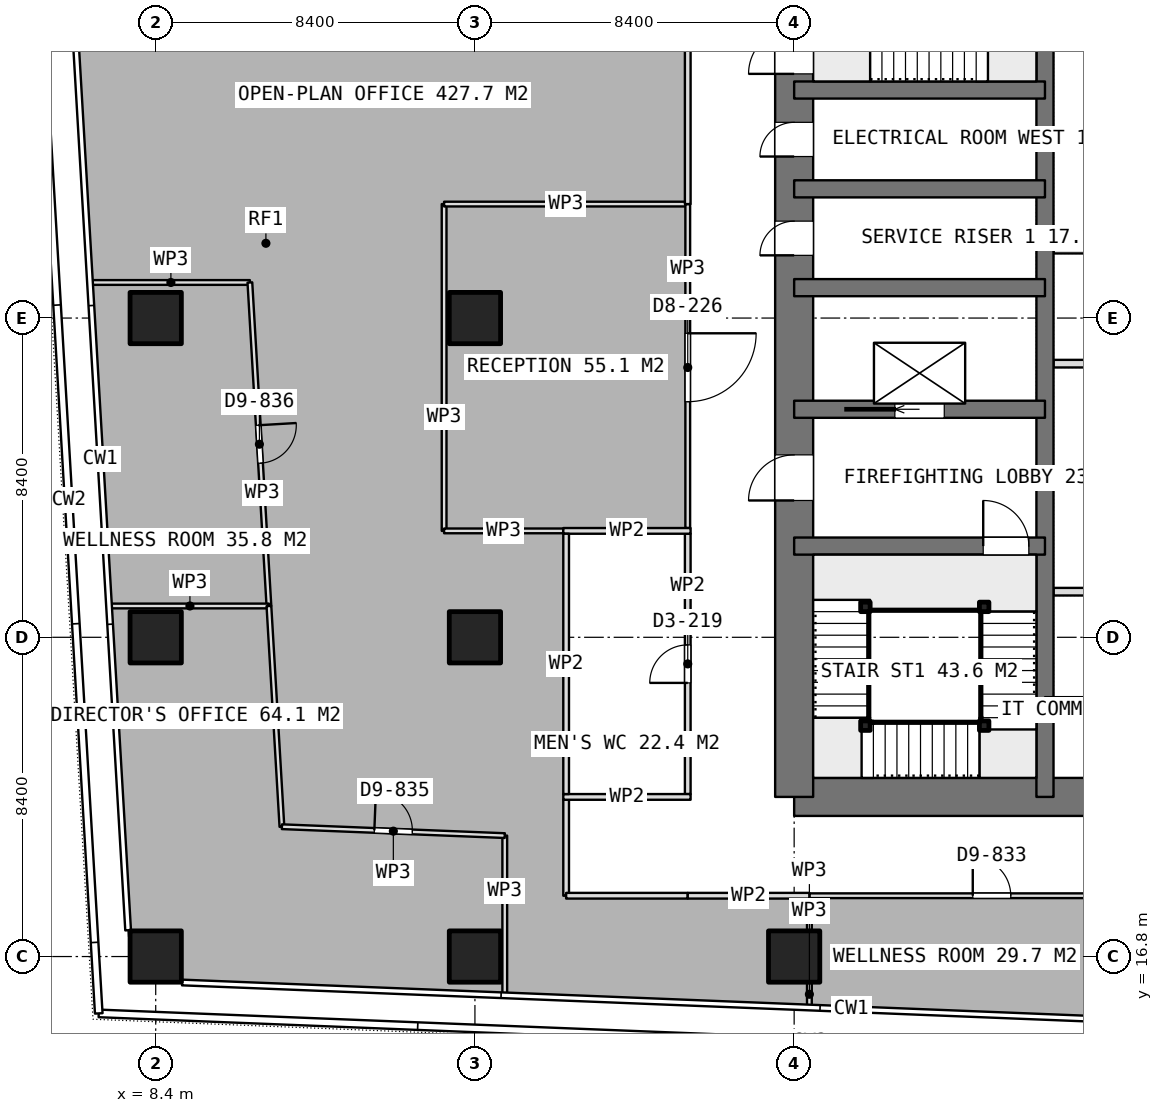
"""IFC4 building model, lengths in metres.
Left out: names, types, materials, properties, quantities, classifications, styles, units other than length and angle.
Written with IfcOpenShell. Run it as: python <this file> out.ifc"""

import sys

from ifc_helpers import new_model, si_unit, direction, frame, frame_2d, origin, origin_2d, place, context, subcontext, project, spatial, rectangle, extrude, element, fill, save


model = new_model("IFC4")
c1 = context("Model", 3, precision=1e-05, world=origin(), true_north=direction((0.0, 1.0)))
c2 = subcontext(c1, "Body", "Model", "MODEL_VIEW")
j1 = project(units=[si_unit("LENGTHUNIT", "METRE"), si_unit("PLANEANGLEUNIT", "RADIAN")], contexts=[c1])
p1 = place(None, origin())
s1 = spatial("IfcSite", under=j1, at=p1, CompositionType="ELEMENT")
p2 = place(p1, origin())
s2 = spatial("IfcBuilding", under=s1, at=p2, CompositionType="ELEMENT")
p3 = place(p2, frame((0.0, 0.0, 206.45)))
s3 = spatial("IfcBuildingStorey", under=s2, at=p3, CompositionType="ELEMENT", Elevation=206.45)
p4 = place(p3, frame((25.2, 21.0, 0.0), z_axis=(0.0, 0.0, 1.0), x_axis=(1.0, 0.0, 0.0)))
e1 = element("IfcWall", 1, at=p4, inside=s3, PredefinedType="SHEAR", context=c2, shape_type="SweptSolid", body=[
    extrude(rectangle(XDim=10.4, YDim=1.0, at=frame_2d((5.2, 0.0))), origin(), (0.0, 0.0, 1.0), 3.75),
])
p5 = place(p3, frame((25.2, 21.0, 0.0), z_axis=(0.0, 0.0, 1.0), x_axis=(0.0, 1.0, 0.0)))
e2 = element("IfcWall", 2, at=p5, inside=s3, PredefinedType="SHEAR", context=c2, shape_type="SweptSolid", body=[
    extrude(rectangle(XDim=25.2, YDim=1.0, at=frame_2d((12.6, 0.0))), origin(), (0.0, 0.0, 1.0), 3.75),
])
p6 = place(p5, frame((7.8, 0.0, 0.0)))
e3 = element("IfcOpeningElement", 3, at=p6, cuts=e2, PredefinedType="OPENING", context=c2, shape_type="SweptSolid", body=[
    extrude(rectangle(XDim=1.2, YDim=2.1, at=frame_2d((0.6, 1.05))), frame((0.0, 0.51, 0.0), z_axis=(0.0, -1.0, 0.0), x_axis=(1.0, 0.0, 0.0)), (0.0, 0.0, 1.0), 1.02),
])
p7 = place(p5, frame((14.25, 0.0, 0.0)))
e4 = element("IfcOpeningElement", 4, at=p7, cuts=e2, PredefinedType="OPENING", context=c2, shape_type="SweptSolid", body=[
    extrude(rectangle(XDim=0.9, YDim=2.1, at=frame_2d((0.45, 1.05))), frame((0.0, 0.51, 0.0), z_axis=(0.0, -1.0, 0.0), x_axis=(1.0, 0.0, 0.0)), (0.0, 0.0, 1.0), 1.02),
])
p8 = place(p5, frame((16.85, 0.0, 0.0)))
e5 = element("IfcOpeningElement", 5, at=p8, cuts=e2, PredefinedType="OPENING", context=c2, shape_type="SweptSolid", body=[
    extrude(rectangle(XDim=0.9, YDim=2.1, at=frame_2d((0.45, 1.05))), frame((0.0, 0.51, 0.0), z_axis=(0.0, -1.0, 0.0), x_axis=(1.0, 0.0, 0.0)), (0.0, 0.0, 1.0), 1.02),
])
p9 = place(p5, frame((19.025, 0.0, 0.0)))
e6 = element("IfcOpeningElement", 6, at=p9, cuts=e2, PredefinedType="OPENING", context=c2, shape_type="SweptSolid", body=[
    extrude(rectangle(XDim=1.2, YDim=2.1, at=frame_2d((0.6, 1.05))), frame((0.0, 0.51, 0.0), z_axis=(0.0, -1.0, 0.0), x_axis=(1.0, 0.0, 0.0)), (0.0, 0.0, 1.0), 1.02),
])
p10 = place(p3, frame((31.8, 21.0, 0.0), z_axis=(0.0, 0.0, 1.0), x_axis=(0.0, 1.0, 0.0)))
e7 = element("IfcWall", 7, at=p10, inside=s3, PredefinedType="SHEAR", context=c2, shape_type="SweptSolid", body=[
    extrude(rectangle(XDim=25.2, YDim=0.45, at=frame_2d((12.6, 0.0))), origin(), (0.0, 0.0, 1.0), 3.75),
])
p11 = place(p3, frame((31.8, 23.4, 0.0), z_axis=(0.0, 0.0, 1.0), x_axis=(1.0, 0.0, 0.0)))
e8 = element("IfcWall", 8, at=p11, inside=s3, PredefinedType="SHEAR", context=c2, shape_type="SweptSolid", body=[
    extrude(rectangle(XDim=3.8, YDim=0.45, at=frame_2d((1.9, 0.0))), origin(), (0.0, 0.0, 1.0), 3.75),
])
p12 = place(p3, frame((25.2, 27.6, 0.0), z_axis=(0.0, 0.0, 1.0), x_axis=(1.0, 0.0, 0.0)))
e9 = element("IfcWall", 9, at=p12, inside=s3, PredefinedType="SHEAR", context=c2, shape_type="SweptSolid", body=[
    extrude(rectangle(XDim=6.6, YDim=0.45, at=frame_2d((3.3, 0.0))), origin(), (0.0, 0.0, 1.0), 3.75),
])
p13 = place(p12, frame((4.975, 0.0, 0.0)))
e10 = element("IfcOpeningElement", 10, at=p13, cuts=e9, PredefinedType="OPENING", context=c2, shape_type="SweptSolid", body=[
    extrude(rectangle(XDim=1.2, YDim=2.1, at=frame_2d((0.6, 1.05))), frame((0.0, 0.235, 0.0), z_axis=(0.0, -1.0, 0.0), x_axis=(1.0, 0.0, 0.0)), (0.0, 0.0, 1.0), 0.47),
])
p14 = place(p3, frame((25.2, 31.2, 0.0), z_axis=(0.0, 0.0, 1.0), x_axis=(1.0, 0.0, 0.0)))
e11 = element("IfcWall", 11, at=p14, inside=s3, PredefinedType="SHEAR", context=c2, shape_type="SweptSolid", body=[
    extrude(rectangle(XDim=6.6, YDim=0.45, at=frame_2d((3.3, 0.0))), origin(), (0.0, 0.0, 1.0), 3.75),
])
p15 = place(p14, frame((2.65, 0.0, 0.0)))
e12 = element("IfcOpeningElement", 12, at=p15, cuts=e11, PredefinedType="OPENING", context=c2, shape_type="SweptSolid", body=[
    extrude(rectangle(XDim=1.3, YDim=2.1, at=frame_2d((0.65, 1.05))), frame((0.0, 0.235, 0.0), z_axis=(0.0, -1.0, 0.0), x_axis=(1.0, 0.0, 0.0)), (0.0, 0.0, 1.0), 0.47),
])
for number, where, z_axis, x_axis in (
    (13, (25.2, 34.4, 0.0), (0.0, 0.0, 1.0), (1.0, 0.0, 0.0)),
    (14, (25.2, 37.0, 0.0), (0.0, 0.0, 1.0), (1.0, 0.0, 0.0)),
    (15, (25.2, 39.6, 0.0), (0.0, 0.0, 1.0), (1.0, 0.0, 0.0)),
):
    element("IfcWall", number, at=place(p3, frame(where, z_axis=z_axis, x_axis=x_axis)), inside=s3, PredefinedType="SHEAR", context=c2, shape_type="SweptSolid", body=[
        extrude(rectangle(XDim=6.6, YDim=0.45, at=frame_2d((3.3, 0.0))), origin(), (0.0, 0.0, 1.0), 3.75),
    ])
for number, where, z_axis, x_axis in (
    (16, (8.4, 16.8, 0.0), (0.0, 0.0, 1.0), (1.0, 0.0, 0.0)),
    (17, (8.4, 25.2, 0.0), (0.0, 0.0, 1.0), (1.0, 0.0, 0.0)),
    (18, (8.4, 33.6, 0.0), (0.0, 0.0, 1.0), (1.0, 0.0, 0.0)),
    (19, (16.8, 16.8, 0.0), (0.0, 0.0, 1.0), (1.0, 0.0, 0.0)),
    (20, (16.8, 25.2, 0.0), (0.0, 0.0, 1.0), (1.0, 0.0, 0.0)),
    (21, (16.8, 33.6, 0.0), (0.0, 0.0, 1.0), (1.0, 0.0, 0.0)),
    (22, (25.2, 16.8, 0.0), (0.0, 0.0, 1.0), (1.0, 0.0, 0.0)),
):
    element("IfcColumn", number, at=place(p3, frame(where, z_axis=z_axis, x_axis=x_axis)), inside=s3, PredefinedType="COLUMN", context=c2, shape_type="SweptSolid", body=[
        extrude(rectangle(XDim=1.35, YDim=1.35, at=origin_2d()), origin(), (0.0, 0.0, 1.0), 3.75),
    ])
for number, where, z_axis, x_axis in (
    (23, (32.025, 26.4, 0.0), (0.0, 0.0, 1.0), (1.0, 0.0, 0.0)),
    (24, (32.025, 29.4, 0.0), (0.0, 0.0, 1.0), (1.0, 0.0, 0.0)),
    (25, (32.025, 32.4, 0.0), (0.0, 0.0, 1.0), (1.0, 0.0, 0.0)),
    (26, (32.025, 35.4, 0.0), (0.0, 0.0, 1.0), (1.0, 0.0, 0.0)),
    (27, (32.025, 38.4, 0.0), (0.0, 0.0, 1.0), (1.0, 0.0, 0.0)),
):
    element("IfcWall", number, at=place(p3, frame(where, z_axis=z_axis, x_axis=x_axis)), inside=s3, PredefinedType="PARTITIONING", context=c2, shape_type="SweptSolid", body=[
        extrude(rectangle(XDim=3.35, YDim=0.2, at=frame_2d((1.675, 0.0))), origin(), (0.0, 0.0, 1.0), 3.5),
    ])
for number, where, z_axis, x_axis in (
    (28, (19.125, 21.0, 0.0), (0.0, 0.0, 1.0), (1.0, 0.0, 0.0)),
    (29, (19.125, 28.0, 0.0), (0.0, 0.0, 1.0), (1.0, 0.0, 0.0)),
):
    element("IfcWall", number, at=place(p3, frame(where, z_axis=z_axis, x_axis=x_axis)), inside=s3, PredefinedType="PARTITIONING", context=c2, shape_type="SweptSolid", body=[
        extrude(rectangle(XDim=3.35, YDim=0.15, at=frame_2d((1.675, 0.0))), origin(), (0.0, 0.0, 1.0), 3.5),
    ])
p16 = place(p3, frame((19.2, 21.075, 0.0), z_axis=(0.0, 0.0, 1.0), x_axis=(0.0, 1.0, 0.0)))
e30 = element("IfcWall", 30, at=p16, inside=s3, PredefinedType="PARTITIONING", context=c2, shape_type="SweptSolid", body=[
    extrude(rectangle(XDim=6.85, YDim=0.15, at=frame_2d((3.425, 0.0))), origin(), (0.0, 0.0, 1.0), 3.5),
])
p17 = place(p3, frame((22.4, 21.075, 0.0), z_axis=(0.0, 0.0, 1.0), x_axis=(0.0, 1.0, 0.0)))
e31 = element("IfcWall", 31, at=p17, inside=s3, PredefinedType="PARTITIONING", context=c2, shape_type="SweptSolid", body=[
    extrude(rectangle(XDim=6.85, YDim=0.15, at=frame_2d((3.425, 0.0))), origin(), (0.0, 0.0, 1.0), 3.5),
])
p18 = place(p17, frame((2.925, 0.0, 0.0)))
e32 = element("IfcOpeningElement", 32, at=p18, cuts=e31, PredefinedType="OPENING", context=c2, shape_type="SweptSolid", body=[
    extrude(rectangle(XDim=1.0, YDim=2.1, at=frame_2d((0.5, 1.05))), frame((0.0, 0.085, 0.0), z_axis=(0.0, -1.0, 0.0), x_axis=(1.0, 0.0, 0.0)), (0.0, 0.0, 1.0), 0.17),
])
p19 = place(p3, frame((6.721, 34.536, 0.0), z_axis=(0.0, 0.0, 1.0), x_axis=(1.0, 0.0, 0.0)))
e33 = element("IfcWall", 33, at=p19, inside=s3, PredefinedType="PARTITIONING", context=c2, shape_type="SweptSolid", body=[
    extrude(rectangle(XDim=4.157, YDim=0.125, at=frame_2d((2.079, 0.0))), origin(), (0.0, 0.0, 1.0), 3.5),
])
p20 = place(p3, frame((10.878, 34.536, 0.0), z_axis=(0.0, 0.0, 1.0), x_axis=(0.058753912615, -0.998272496742, 0.0)))
e34 = element("IfcWall", 34, at=p20, inside=s3, PredefinedType="PARTITIONING", context=c2, shape_type="SweptSolid", body=[
    extrude(rectangle(XDim=8.527, YDim=0.125, at=frame_2d((4.263, 0.0))), origin(), (0.0, 0.0, 1.0), 3.5),
])
p21 = place(p20, frame((3.763, 0.0, 0.0)))
e35 = element("IfcOpeningElement", 35, at=p21, cuts=e34, PredefinedType="OPENING", context=c2, shape_type="SweptSolid", body=[
    extrude(rectangle(XDim=1.0, YDim=2.1, at=frame_2d((0.5, 1.05))), frame((0.0, 0.073, 0.0), z_axis=(0.0, -1.0, 0.0), x_axis=(1.0, 0.0, 0.0)), (0.0, 0.0, 1.0), 0.145),
])
p22 = place(p3, frame((11.379, 26.024, 0.0), z_axis=(0.0, 0.0, 1.0), x_axis=(-1.0, 0.0, 0.0)))
e36 = element("IfcWall", 36, at=p22, inside=s3, PredefinedType="PARTITIONING", context=c2, shape_type="SweptSolid", body=[
    extrude(rectangle(XDim=4.157, YDim=0.125, at=frame_2d((2.079, 0.0))), origin(), (0.0, 0.0, 1.0), 3.5),
])
p23 = place(p3, frame((17.585, 19.982, 0.0), z_axis=(0.0, 0.0, 1.0), x_axis=(0.0, -1.0, 0.0)))
e37 = element("IfcWall", 37, at=p23, inside=s3, PredefinedType="PARTITIONING", context=c2, shape_type="SweptSolid", body=[
    extrude(rectangle(XDim=4.153, YDim=0.125, at=frame_2d((2.076, 0.0))), origin(), (0.0, 0.0, 1.0), 3.5),
])
p24 = place(p3, frame((11.379, 26.023, 0.0), z_axis=(0.0, 0.0, 1.0), x_axis=(0.058800752748, -0.998269738836, 0.0)))
e38 = element("IfcWall", 38, at=p24, inside=s3, PredefinedType="PARTITIONING", context=c2, shape_type="SweptSolid", body=[
    extrude(rectangle(XDim=5.817, YDim=0.125, at=frame_2d((2.908, 0.0))), origin(), (0.0, 0.0, 1.0), 3.5),
])
p25 = place(p3, frame((11.721, 20.216, 0.0), z_axis=(0.0, 0.0, 1.0), x_axis=(0.999203880049, -0.039894938214, 0.0)))
e39 = element("IfcWall", 39, at=p25, inside=s3, PredefinedType="PARTITIONING", context=c2, shape_type="SweptSolid", body=[
    extrude(rectangle(XDim=5.869, YDim=0.125, at=frame_2d((2.934, 0.0))), origin(), (0.0, 0.0, 1.0), 3.5),
])
p26 = place(p25, frame((2.434, 0.0, 0.0)))
e40 = element("IfcOpeningElement", 40, at=p26, cuts=e39, PredefinedType="OPENING", context=c2, shape_type="SweptSolid", body=[
    extrude(rectangle(XDim=1.0, YDim=2.1, at=frame_2d((0.5, 1.05))), frame((0.0, 0.073, 0.0), z_axis=(0.0, -1.0, 0.0), x_axis=(1.0, 0.0, 0.0)), (0.0, 0.0, 1.0), 0.145),
])
p27 = place(p3, frame((25.601, 15.509, 0.0), z_axis=(0.0, 0.0, 1.0), x_axis=(0.0, 1.0, 0.0)))
e41 = element("IfcWall", 41, at=p27, inside=s3, PredefinedType="PARTITIONING", context=c2, shape_type="SweptSolid", body=[
    extrude(rectangle(XDim=0.596, YDim=0.125, at=frame_2d((0.298, 0.0))), origin(), (0.0, 0.0, 1.0), 3.5),
])
p28 = place(p3, frame((25.601, 17.495, 0.0), z_axis=(0.0, 0.0, 1.0), x_axis=(0.0, 1.0, 0.0)))
e42 = element("IfcWall", 42, at=p28, inside=s3, PredefinedType="PARTITIONING", context=c2, shape_type="SweptSolid", body=[
    extrude(rectangle(XDim=0.905, YDim=0.125, at=frame_2d((0.452, 0.0))), origin(), (0.0, 0.0, 1.0), 3.5),
])
p29 = place(p3, frame((25.601, 18.4, 0.0), z_axis=(0.0, 0.0, 1.0), x_axis=(1.0, 0.0, 0.0)))
e43 = element("IfcWall", 43, at=p29, inside=s3, PredefinedType="PARTITIONING", context=c2, shape_type="SweptSolid", body=[
    extrude(rectangle(XDim=9.597, YDim=0.125, at=frame_2d((4.798, 0.0))), origin(), (0.0, 0.0, 1.0), 3.5),
])
p30 = place(p29, frame((4.299, 0.0, 0.0)))
e44 = element("IfcOpeningElement", 44, at=p30, cuts=e43, PredefinedType="OPENING", context=c2, shape_type="SweptSolid", body=[
    extrude(rectangle(XDim=1.0, YDim=2.1, at=frame_2d((0.5, 1.05))), frame((0.0, 0.073, 0.0), z_axis=(0.0, -1.0, 0.0), x_axis=(1.0, 0.0, 0.0)), (0.0, 0.0, 1.0), 0.145),
])
p31 = place(p3, frame((15.989, 28.0, 0.0), z_axis=(0.0, 0.0, 1.0), x_axis=(0.0, 1.0, 0.0)))
e45 = element("IfcWall", 45, at=p31, inside=s3, PredefinedType="PARTITIONING", context=c2, shape_type="SweptSolid", body=[
    extrude(rectangle(XDim=8.599, YDim=0.125, at=frame_2d((4.3, 0.0))), origin(), (0.0, 0.0, 1.0), 3.5),
])
p32 = place(p3, frame((15.989, 36.599, 0.0), z_axis=(0.0, 0.0, 1.0), x_axis=(1.0, 0.0, 0.0)))
e46 = element("IfcWall", 46, at=p32, inside=s3, PredefinedType="PARTITIONING", context=c2, shape_type="SweptSolid", body=[
    extrude(rectangle(XDim=6.411, YDim=0.125, at=frame_2d((3.206, 0.0))), origin(), (0.0, 0.0, 1.0), 3.5),
])
p33 = place(p3, frame((22.4, 36.599, 0.0), z_axis=(0.0, 0.0, 1.0), x_axis=(0.0, -1.0, 0.0)))
e47 = element("IfcWall", 47, at=p33, inside=s3, PredefinedType="PARTITIONING", context=c2, shape_type="SweptSolid", body=[
    extrude(rectangle(XDim=8.524, YDim=0.125, at=frame_2d((4.262, 0.0))), origin(), (0.0, 0.0, 1.0), 3.5),
])
p34 = place(p33, frame((3.4, 0.0, 0.0)))
e48 = element("IfcOpeningElement", 48, at=p34, cuts=e47, PredefinedType="OPENING", context=c2, shape_type="SweptSolid", body=[
    extrude(rectangle(XDim=1.8, YDim=2.1, at=frame_2d((0.9, 1.05))), frame((0.0, 0.073, 0.0), z_axis=(0.0, -1.0, 0.0), x_axis=(1.0, 0.0, 0.0)), (0.0, 0.0, 1.0), 0.145),
])
p35 = place(p3, frame((19.125, 28.0, 0.0), z_axis=(0.0, 0.0, 1.0), x_axis=(-1.0, 0.0, 0.0)))
e49 = element("IfcWall", 49, at=p35, inside=s3, PredefinedType="PARTITIONING", context=c2, shape_type="SweptSolid", body=[
    extrude(rectangle(XDim=3.136, YDim=0.125, at=frame_2d((1.568, 0.0))), origin(), (0.0, 0.0, 1.0), 3.5),
])
p36 = place(p3, frame((22.4, 52.575, 0.0), z_axis=(0.0, 0.0, 1.0), x_axis=(0.0, -1.0, 0.0)))
e50 = element("IfcWall", 50, at=p36, inside=s3, PredefinedType="PARTITIONING", context=c2, shape_type="SweptSolid", body=[
    extrude(rectangle(XDim=15.976, YDim=0.15, at=frame_2d((7.988, 0.0))), origin(), (0.0, 0.0, 1.0), 3.5),
])
p37 = place(p36, frame((7.488, 0.0, 0.0)))
e51 = element("IfcOpeningElement", 51, at=p37, cuts=e50, PredefinedType="OPENING", context=c2, shape_type="SweptSolid", body=[
    extrude(rectangle(XDim=1.0, YDim=2.1, at=frame_2d((0.5, 1.05))), frame((0.0, 0.085, 0.0), z_axis=(0.0, -1.0, 0.0), x_axis=(1.0, 0.0, 0.0)), (0.0, 0.0, 1.0), 0.17),
])
p38 = place(p3, frame((19.2, 20.925, 0.0), z_axis=(0.0, 0.0, 1.0), x_axis=(0.0, -1.0, 0.0)))
e52 = element("IfcWall", 52, at=p38, inside=s3, PredefinedType="PARTITIONING", context=c2, shape_type="SweptSolid", body=[
    extrude(rectangle(XDim=2.525, YDim=0.15, at=frame_2d((1.263, 0.0))), origin(), (0.0, 0.0, 1.0), 3.5),
])
p39 = place(p3, frame((19.2, 18.4, 0.0), z_axis=(0.0, 0.0, 1.0), x_axis=(1.0, 0.0, 0.0)))
e53 = element("IfcWall", 53, at=p39, inside=s3, PredefinedType="PARTITIONING", context=c2, shape_type="SweptSolid", body=[
    extrude(rectangle(XDim=3.2, YDim=0.15, at=frame_2d((1.6, 0.0))), origin(), (0.0, 0.0, 1.0), 3.5),
])
p40 = place(p3, frame((22.4, 18.4, 0.0), z_axis=(0.0, 0.0, 1.0), x_axis=(1.0, 0.0, 0.0)))
e54 = element("IfcWall", 54, at=p40, inside=s3, PredefinedType="PARTITIONING", context=c2, shape_type="SweptSolid", body=[
    extrude(rectangle(XDim=3.201, YDim=0.15, at=frame_2d((1.601, 0.0))), origin(), (0.0, 0.0, 1.0), 3.5),
])
for number, where, z_axis, x_axis in (
    (55, (30.2, 26.0, 0.0), (0.0, 0.0, 1.0), (1.0, 0.0, 0.0)),
    (56, (30.2, 22.875, 0.0), (0.0, 0.0, 1.0), (1.0, 0.0, 0.0)),
    (57, (27.075, 22.875, 0.0), (0.0, 0.0, 1.0), (1.0, 0.0, 0.0)),
    (58, (27.075, 26.0, 0.0), (0.0, 0.0, 1.0), (1.0, 0.0, 0.0)),
):
    element("IfcColumn", number, at=place(p3, frame(where, z_axis=z_axis, x_axis=x_axis)), inside=s3, PredefinedType="COLUMN", context=c2, shape_type="SweptSolid", body=[
        extrude(rectangle(XDim=0.25, YDim=0.25, at=origin_2d()), origin(), (0.0, 0.0, 1.0), 3.75),
    ])
p41 = place(p6, origin())
e59 = element("IfcDoor", 59, at=p41, inside=s3, OperationType="SINGLE_SWING_LEFT", PredefinedType="DOOR", context=c2, shape_type="SweptSolid", body=[
    extrude(rectangle(XDim=1.2, YDim=2.1, at=frame_2d((0.6, 1.05))), frame((0.0, 0.025, 0.0), z_axis=(0.0, -1.0, 0.0), x_axis=(1.0, 0.0, 0.0)), (0.0, 0.0, 1.0), 0.05),
])
fill(e3, e59)
p42 = place(p7, origin())
e60 = element("IfcDoor", 60, at=p42, inside=s3, OperationType="SINGLE_SWING_LEFT", PredefinedType="DOOR", context=c2, shape_type="SweptSolid", body=[
    extrude(rectangle(XDim=0.9, YDim=2.1, at=frame_2d((0.45, 1.05))), frame((0.0, 0.025, 0.0), z_axis=(0.0, -1.0, 0.0), x_axis=(1.0, 0.0, 0.0)), (0.0, 0.0, 1.0), 0.05),
])
fill(e4, e60)
p43 = place(p8, origin())
e61 = element("IfcDoor", 61, at=p43, inside=s3, OperationType="SINGLE_SWING_LEFT", PredefinedType="DOOR", context=c2, shape_type="SweptSolid", body=[
    extrude(rectangle(XDim=0.9, YDim=2.1, at=frame_2d((0.45, 1.05))), frame((0.0, 0.025, 0.0), z_axis=(0.0, -1.0, 0.0), x_axis=(1.0, 0.0, 0.0)), (0.0, 0.0, 1.0), 0.05),
])
fill(e5, e61)
p44 = place(p15, origin())
e62 = element("IfcDoor", 62, at=p44, inside=s3, OperationType="SLIDING_TO_LEFT", PredefinedType="USERDEFINED", context=c2, shape_type="SweptSolid", body=[
    extrude(rectangle(XDim=1.3, YDim=2.1, at=frame_2d((0.65, 1.05))), frame((0.0, 0.025, 0.0), z_axis=(0.0, -1.0, 0.0), x_axis=(1.0, 0.0, 0.0)), (0.0, 0.0, 1.0), 0.05),
])
fill(e12, e62)
p45 = place(p18, origin())
e63 = element("IfcDoor", 63, at=p45, inside=s3, OperationType="SINGLE_SWING_LEFT", PredefinedType="DOOR", context=c2, shape_type="SweptSolid", body=[
    extrude(rectangle(XDim=1.0, YDim=2.1, at=frame_2d((0.5, 1.05))), frame((0.0, 0.025, 0.0), z_axis=(0.0, -1.0, 0.0), x_axis=(1.0, 0.0, 0.0)), (0.0, 0.0, 1.0), 0.05),
])
fill(e32, e63)
p46 = place(p21, origin())
e64 = element("IfcDoor", 64, at=p46, inside=s3, OperationType="SINGLE_SWING_LEFT", PredefinedType="DOOR", context=c2, shape_type="SweptSolid", body=[
    extrude(rectangle(XDim=1.0, YDim=2.1, at=frame_2d((0.5, 1.05))), frame((0.0, 0.025, 0.0), z_axis=(0.0, -1.0, 0.0), x_axis=(1.0, 0.0, 0.0)), (0.0, 0.0, 1.0), 0.05),
])
fill(e35, e64)
p47 = place(p26, origin())
e65 = element("IfcDoor", 65, at=p47, inside=s3, OperationType="SINGLE_SWING_LEFT", PredefinedType="DOOR", context=c2, shape_type="SweptSolid", body=[
    extrude(rectangle(XDim=1.0, YDim=2.1, at=frame_2d((0.5, 1.05))), frame((0.0, 0.025, 0.0), z_axis=(0.0, -1.0, 0.0), x_axis=(1.0, 0.0, 0.0)), (0.0, 0.0, 1.0), 0.05),
])
fill(e40, e65)
p48 = place(p30, origin())
e66 = element("IfcDoor", 66, at=p48, inside=s3, OperationType="SINGLE_SWING_LEFT", PredefinedType="DOOR", context=c2, shape_type="SweptSolid", body=[
    extrude(rectangle(XDim=1.0, YDim=2.1, at=frame_2d((0.5, 1.05))), frame((0.0, 0.025, 0.0), z_axis=(0.0, -1.0, 0.0), x_axis=(1.0, 0.0, 0.0)), (0.0, 0.0, 1.0), 0.05),
])
fill(e44, e66)
p49 = place(p34, origin())
e67 = element("IfcDoor", 67, at=p49, inside=s3, OperationType="DOUBLE_DOOR_SINGLE_SWING", PredefinedType="DOOR", context=c2, shape_type="SweptSolid", body=[
    extrude(rectangle(XDim=1.8, YDim=2.1, at=frame_2d((0.9, 1.05))), frame((0.0, 0.025, 0.0), z_axis=(0.0, -1.0, 0.0), x_axis=(1.0, 0.0, 0.0)), (0.0, 0.0, 1.0), 0.05),
])
fill(e48, e67)
p50 = place(p13, origin())
e68 = element("IfcDoor", 68, at=p50, inside=s3, OperationType="SINGLE_SWING_RIGHT", PredefinedType="DOOR", context=c2, shape_type="SweptSolid", body=[
    extrude(rectangle(XDim=1.2, YDim=2.1, at=frame_2d((0.6, 1.05))), frame((0.0, 0.025, 0.0), z_axis=(0.0, -1.0, 0.0), x_axis=(1.0, 0.0, 0.0)), (0.0, 0.0, 1.0), 0.05),
])
fill(e10, e68)
p51 = place(p9, origin())
e69 = element("IfcDoor", 69, at=p51, inside=s3, OperationType="SINGLE_SWING_RIGHT", PredefinedType="DOOR", context=c2, shape_type="SweptSolid", body=[
    extrude(rectangle(XDim=1.2, YDim=2.1, at=frame_2d((0.6, 1.05))), frame((0.0, 0.025, 0.0), z_axis=(0.0, -1.0, 0.0), x_axis=(1.0, 0.0, 0.0)), (0.0, 0.0, 1.0), 0.05),
])
fill(e6, e69)
save(model, sys.argv[1])
